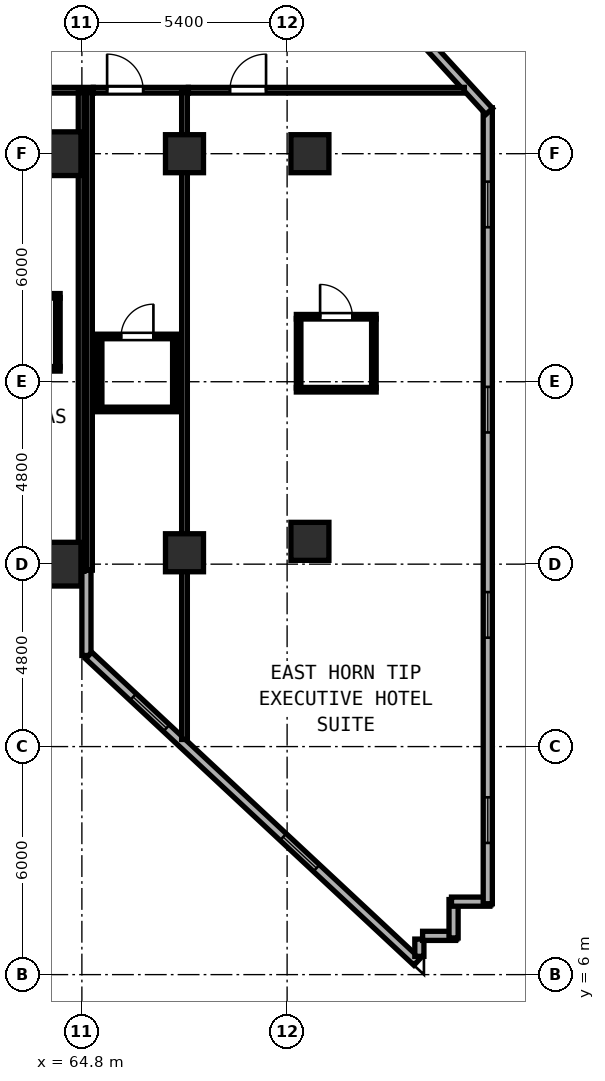
"""IFC4 building model, lengths in metres.
Left out: names, types, materials, properties, quantities, classifications, styles, units other than length and angle.
Written with IfcOpenShell. Run it as: python <this file> out.ifc"""

import sys

from ifc_helpers import new_model, si_unit, direction, frame, frame_2d, origin, origin_2d, place, context, subcontext, project, spatial, rectangle, hollow_rectangle, extrude, element, fill, save


model = new_model("IFC4")
c1 = context("Model", 3, precision=1e-05, world=origin(), true_north=direction((0.0, 1.0)))
c2 = subcontext(c1, "Body", "Model", "MODEL_VIEW")
j1 = project(units=[si_unit("LENGTHUNIT", "METRE"), si_unit("PLANEANGLEUNIT", "RADIAN")], contexts=[c1])
p1 = place(None, origin())
s1 = spatial("IfcSite", under=j1, at=p1, CompositionType="ELEMENT")
p2 = place(p1, origin())
s2 = spatial("IfcBuilding", under=s1, at=p2, CompositionType="ELEMENT")
p3 = place(p2, frame((0.0, 0.0, 62.8)))
s3 = spatial("IfcBuildingStorey", under=s2, at=p3, CompositionType="ELEMENT", Elevation=62.8)
for number, where, z_axis, x_axis in (
    (1, (64.2, 16.8, 0.0), (0.0, 0.0, 1.0), (1.0, 0.0, 0.0)),
    (2, (64.2, 27.6, 0.0), (0.0, 0.0, 1.0), (1.0, 0.0, 0.0)),
):
    element("IfcColumn", number, at=place(p3, frame(where, z_axis=z_axis, x_axis=x_axis)), inside=s3, PredefinedType="COLUMN", context=c2, shape_type="SweptSolid", body=[
        extrude(hollow_rectangle(XDim=1.15, YDim=1.15, WallThickness=0.042, at=origin_2d()), origin(), (0.0, 0.0, 1.0), 3.8),
    ])
for number, where, z_axis, x_axis in (
    (3, (70.8, 17.4, 0.0), (0.0, 0.0, 1.0), (1.0, 0.0, 0.0)),
    (4, (70.8, 27.6, 0.0), (0.0, 0.0, 1.0), (1.0, 0.0, 0.0)),
    (5, (67.5, 17.1, 0.0), (0.0, 0.0, 1.0), (1.0, 0.0, 0.0)),
    (6, (67.5, 27.6, 0.0), (0.0, 0.0, 1.0), (1.0, 0.0, 0.0)),
):
    element("IfcColumn", number, at=place(p3, frame(where, z_axis=z_axis, x_axis=x_axis)), inside=s3, PredefinedType="COLUMN", context=c2, shape_type="SweptSolid", body=[
        extrude(hollow_rectangle(XDim=1.0, YDim=1.0, WallThickness=0.038, at=origin_2d()), origin(), (0.0, 0.0, 1.0), 3.8),
    ])
p4 = place(p3, frame((64.92, 16.64, 0.0), z_axis=(0.0, 0.0, 1.0), x_axis=(0.0, -1.0, 0.0)))
e7 = element("IfcWall", 7, at=p4, inside=s3, PredefinedType="SOLIDWALL", context=c2, shape_type="SweptSolid", body=[
    extrude(rectangle(XDim=2.243, YDim=0.24, at=frame_2d((1.121, 0.0))), origin(), (0.0, 0.0, 1.0), 3.6),
])
p5 = place(p3, frame((64.979, 14.397, 0.0), z_axis=(0.0, 0.0, 1.0), x_axis=(0.731053894258, -0.682319722484, 0.0)))
e8 = element("IfcWall", 8, at=p5, inside=s3, PredefinedType="SOLIDWALL", context=c2, shape_type="SweptSolid", body=[
    extrude(rectangle(XDim=11.818, YDim=0.24, at=frame_2d((5.909, 0.0))), origin(), (0.0, 0.0, 1.0), 3.6),
])
p6 = place(p5, frame((1.6, 0.0, 0.85)))
e9 = element("IfcOpeningElement", 9, at=p6, cuts=e8, PredefinedType="OPENING", context=c2, shape_type="SweptSolid", body=[
    extrude(rectangle(XDim=1.2, YDim=1.85, at=frame_2d((0.6, 0.925))), frame((0.0, 0.13, 0.0), z_axis=(0.0, -1.0, 0.0), x_axis=(1.0, 0.0, 0.0)), (0.0, 0.0, 1.0), 0.26),
])
p7 = place(p5, frame((7.0, 0.0, 0.85)))
e10 = element("IfcOpeningElement", 10, at=p7, cuts=e8, PredefinedType="OPENING", context=c2, shape_type="SweptSolid", body=[
    extrude(rectangle(XDim=1.2, YDim=1.85, at=frame_2d((0.6, 0.925))), frame((0.0, 0.13, 0.0), z_axis=(0.0, -1.0, 0.0), x_axis=(1.0, 0.0, 0.0)), (0.0, 0.0, 1.0), 0.26),
])
p8 = place(p3, frame((73.68, 6.481, 0.0), z_axis=(0.0, 0.0, 1.0), x_axis=(0.0, 1.0, 0.0)))
e11 = element("IfcWall", 11, at=p8, inside=s3, PredefinedType="SOLIDWALL", context=c2, shape_type="SweptSolid", body=[
    extrude(rectangle(XDim=0.454, YDim=0.24, at=frame_2d((0.227, 0.0))), origin(), (0.0, 0.0, 1.0), 3.6),
])
p9 = place(p3, frame((73.765, 7.02, 0.0), z_axis=(0.0, 0.0, 1.0), x_axis=(1.0, 0.0, 0.0)))
e12 = element("IfcWall", 12, at=p9, inside=s3, PredefinedType="SOLIDWALL", context=c2, shape_type="SweptSolid", body=[
    extrude(rectangle(XDim=0.87, YDim=0.24, at=frame_2d((0.435, 0.0))), origin(), (0.0, 0.0, 1.0), 3.6),
])
for number, where, z_axis, x_axis in (
    (13, (74.58, 6.965, 0.0), (0.0, 0.0, 1.0), (0.0, 1.0, 0.0)),
    (14, (74.525, 7.92, 0.0), (0.0, 0.0, 1.0), (1.0, 0.0, 0.0)),
):
    element("IfcWall", number, at=place(p3, frame(where, z_axis=z_axis, x_axis=x_axis)), inside=s3, PredefinedType="SOLIDWALL", context=c2, shape_type="SweptSolid", body=[
        extrude(rectangle(XDim=1.01, YDim=0.24, at=frame_2d((0.505, 0.0))), origin(), (0.0, 0.0, 1.0), 3.6),
    ])
p10 = place(p3, frame((75.48, 7.865, 0.0), z_axis=(0.0, 0.0, 1.0), x_axis=(0.0, 1.0, 0.0)))
e15 = element("IfcWall", 15, at=p10, inside=s3, PredefinedType="SOLIDWALL", context=c2, shape_type="SweptSolid", body=[
    extrude(rectangle(XDim=20.943, YDim=0.24, at=frame_2d((10.472, 0.0))), origin(), (0.0, 0.0, 1.0), 3.6),
])
p11 = place(p10, frame((1.6, 0.0, 0.85)))
e16 = element("IfcOpeningElement", 16, at=p11, cuts=e15, PredefinedType="OPENING", context=c2, shape_type="SweptSolid", body=[
    extrude(rectangle(XDim=1.2, YDim=1.85, at=frame_2d((0.6, 0.925))), frame((0.0, 0.13, 0.0), z_axis=(0.0, -1.0, 0.0), x_axis=(1.0, 0.0, 0.0)), (0.0, 0.0, 1.0), 0.26),
])
p12 = place(p10, frame((7.0, 0.0, 0.85)))
e17 = element("IfcOpeningElement", 17, at=p12, cuts=e15, PredefinedType="OPENING", context=c2, shape_type="SweptSolid", body=[
    extrude(rectangle(XDim=1.2, YDim=1.85, at=frame_2d((0.6, 0.925))), frame((0.0, 0.13, 0.0), z_axis=(0.0, -1.0, 0.0), x_axis=(1.0, 0.0, 0.0)), (0.0, 0.0, 1.0), 0.26),
])
p13 = place(p10, frame((12.4, 0.0, 0.85)))
e18 = element("IfcOpeningElement", 18, at=p13, cuts=e15, PredefinedType="OPENING", context=c2, shape_type="SweptSolid", body=[
    extrude(rectangle(XDim=1.2, YDim=1.85, at=frame_2d((0.6, 0.925))), frame((0.0, 0.13, 0.0), z_axis=(0.0, -1.0, 0.0), x_axis=(1.0, 0.0, 0.0)), (0.0, 0.0, 1.0), 0.26),
])
p14 = place(p10, frame((17.8, 0.0, 0.85)))
e19 = element("IfcOpeningElement", 19, at=p14, cuts=e15, PredefinedType="OPENING", context=c2, shape_type="SweptSolid", body=[
    extrude(rectangle(XDim=1.2, YDim=1.85, at=frame_2d((0.6, 0.925))), frame((0.0, 0.13, 0.0), z_axis=(0.0, -1.0, 0.0), x_axis=(1.0, 0.0, 0.0)), (0.0, 0.0, 1.0), 0.26),
])
p15 = place(p3, frame((75.517, 28.713, 0.0), z_axis=(0.0, 0.0, 1.0), x_axis=(-0.67574145796, 0.737138712858, 0.0)))
e20 = element("IfcWall", 20, at=p15, inside=s3, PredefinedType="SOLIDWALL", context=c2, shape_type="SweptSolid", body=[
    extrude(rectangle(XDim=3.284, YDim=0.24, at=frame_2d((1.642, 0.0))), origin(), (0.0, 0.0, 1.0), 3.6),
])
p16 = place(p3, frame((61.442, 29.27, 0.0), z_axis=(0.0, 0.0, 1.0), x_axis=(1.0, 0.0, 0.0)))
e21 = element("IfcWall", 21, at=p16, inside=s3, PredefinedType="PARTITIONING", context=c2, shape_type="SweptSolid", body=[
    extrude(rectangle(XDim=3.658, YDim=0.15, at=frame_2d((1.829, 0.0))), origin(), (0.0, 0.0, 1.0), 3.6),
])
p17 = place(p16, frame((1.09, 0.0, 0.0), z_axis=(0.0, 0.0, 1.0), x_axis=(-1.0, 0.0, 0.0)))
e22 = element("IfcOpeningElement", 22, at=p17, cuts=e21, PredefinedType="OPENING", context=c2, shape_type="SweptSolid", body=[
    extrude(rectangle(XDim=0.95, YDim=2.15, at=frame_2d((0.475, 1.075))), frame((0.0, 0.085, 0.0), z_axis=(0.0, -1.0, 0.0), x_axis=(1.0, 0.0, 0.0)), (0.0, 0.0, 1.0), 0.17),
])
p18 = place(p3, frame((65.0, 16.642, 0.0), z_axis=(0.0, 0.0, 1.0), x_axis=(0.0, 1.0, 0.0)))
e23 = element("IfcWall", 23, at=p18, inside=s3, PredefinedType="PARTITIONING", context=c2, shape_type="SweptSolid", body=[
    extrude(rectangle(XDim=12.568, YDim=0.15, at=frame_2d((6.284, 0.0))), origin(), (0.0, 0.0, 1.0), 3.6),
])
p19 = place(p3, frame((62.128, 23.86, 0.0), z_axis=(0.0, 0.0, 1.0), x_axis=(1.0, 0.0, 0.0)))
e24 = element("IfcWall", 24, at=p19, inside=s3, PredefinedType="PARTITIONING", context=c2, shape_type="SweptSolid", body=[
    extrude(rectangle(XDim=2.1, YDim=0.12, at=frame_2d((1.05, 0.0))), origin(), (0.0, 0.0, 1.0), 3.6),
])
p20 = place(p19, frame((1.475, 0.0, 0.0), z_axis=(0.0, 0.0, 1.0), x_axis=(-1.0, 0.0, 0.0)))
e25 = element("IfcOpeningElement", 25, at=p20, cuts=e24, PredefinedType="OPENING", context=c2, shape_type="SweptSolid", body=[
    extrude(rectangle(XDim=0.85, YDim=2.1, at=frame_2d((0.425, 1.05))), frame((0.0, 0.07, 0.0), z_axis=(0.0, -1.0, 0.0), x_axis=(1.0, 0.0, 0.0)), (0.0, 0.0, 1.0), 0.14),
])
p21 = place(p3, frame((62.128, 21.94, 0.0), z_axis=(0.0, 0.0, 1.0), x_axis=(1.0, 0.0, 0.0)))
e26 = element("IfcWall", 26, at=p21, inside=s3, PredefinedType="PARTITIONING", context=c2, shape_type="SweptSolid", body=[
    extrude(rectangle(XDim=2.1, YDim=0.12, at=frame_2d((1.05, 0.0))), origin(), (0.0, 0.0, 1.0), 3.6),
])
p22 = place(p3, frame((64.168, 21.985, 0.0), z_axis=(0.0, 0.0, 1.0), x_axis=(0.0, 1.0, 0.0)))
e27 = element("IfcWall", 27, at=p22, inside=s3, PredefinedType="PARTITIONING", context=c2, shape_type="SweptSolid", body=[
    extrude(rectangle(XDim=1.83, YDim=0.12, at=frame_2d((0.915, 0.0))), origin(), (0.0, 0.0, 1.0), 3.097),
])
p23 = place(p3, frame((65.102, 29.27, 0.0), z_axis=(0.0, 0.0, 1.0), x_axis=(1.0, 0.0, 0.0)))
e28 = element("IfcWall", 28, at=p23, inside=s3, PredefinedType="PARTITIONING", context=c2, shape_type="SweptSolid", body=[
    extrude(rectangle(XDim=2.498, YDim=0.15, at=frame_2d((1.249, 0.0))), origin(), (0.0, 0.0, 1.0), 3.6),
])
p24 = place(p23, frame((1.312, 0.0, 0.0), z_axis=(0.0, 0.0, 1.0), x_axis=(-1.0, 0.0, 0.0)))
e29 = element("IfcOpeningElement", 29, at=p24, cuts=e28, PredefinedType="OPENING", context=c2, shape_type="SweptSolid", body=[
    extrude(rectangle(XDim=0.95, YDim=2.15, at=frame_2d((0.475, 1.075))), frame((0.0, 0.085, 0.0), z_axis=(0.0, -1.0, 0.0), x_axis=(1.0, 0.0, 0.0)), (0.0, 0.0, 1.0), 0.17),
])
p25 = place(p3, frame((67.5, 12.188, 0.0), z_axis=(0.0, 0.0, 1.0), x_axis=(0.0, 1.0, 0.0)))
e30 = element("IfcWall", 30, at=p25, inside=s3, PredefinedType="PARTITIONING", context=c2, shape_type="SweptSolid", body=[
    extrude(rectangle(XDim=17.022, YDim=0.15, at=frame_2d((8.511, 0.0))), origin(), (0.0, 0.0, 1.0), 3.6),
])
p26 = place(p3, frame((64.78, 16.612, 0.0), z_axis=(0.0, 0.0, 1.0), x_axis=(0.0, 1.0, 0.0)))
e31 = element("IfcWall", 31, at=p26, inside=s3, PredefinedType="PARTITIONING", context=c2, shape_type="SweptSolid", body=[
    extrude(rectangle(XDim=12.598, YDim=0.15, at=frame_2d((6.299, 0.0))), origin(), (0.0, 0.0, 1.0), 3.6),
])
p27 = place(p3, frame((65.207, 22.791, 0.0), z_axis=(0.0, 0.0, 1.0), x_axis=(1.0, 0.0, 0.0)))
e32 = element("IfcWall", 32, at=p27, inside=s3, PredefinedType="PARTITIONING", context=c2, shape_type="SweptSolid", body=[
    extrude(rectangle(XDim=2.1, YDim=0.12, at=frame_2d((1.05, 0.0))), origin(), (0.0, 0.0, 1.0), 3.6),
])
p28 = place(p27, frame((1.475, 0.0, 0.0), z_axis=(0.0, 0.0, 1.0), x_axis=(-1.0, 0.0, 0.0)))
e33 = element("IfcOpeningElement", 33, at=p28, cuts=e32, PredefinedType="OPENING", context=c2, shape_type="SweptSolid", body=[
    extrude(rectangle(XDim=0.85, YDim=2.1, at=frame_2d((0.425, 1.05))), frame((0.0, 0.07, 0.0), z_axis=(0.0, -1.0, 0.0), x_axis=(1.0, 0.0, 0.0)), (0.0, 0.0, 1.0), 0.14),
])
p29 = place(p3, frame((65.207, 20.871, 0.0), z_axis=(0.0, 0.0, 1.0), x_axis=(1.0, 0.0, 0.0)))
e34 = element("IfcWall", 34, at=p29, inside=s3, PredefinedType="PARTITIONING", context=c2, shape_type="SweptSolid", body=[
    extrude(rectangle(XDim=2.1, YDim=0.12, at=frame_2d((1.05, 0.0))), origin(), (0.0, 0.0, 1.0), 3.6),
])
for number, where, z_axis, x_axis in (
    (35, (65.267, 20.916, 0.0), (0.0, 0.0, 1.0), (0.0, 1.0, 0.0)),
    (36, (67.247, 20.916, 0.0), (0.0, 0.0, 1.0), (0.0, 1.0, 0.0)),
):
    element("IfcWall", number, at=place(p3, frame(where, z_axis=z_axis, x_axis=x_axis)), inside=s3, PredefinedType="PARTITIONING", context=c2, shape_type="SweptSolid", body=[
        extrude(rectangle(XDim=1.83, YDim=0.12, at=frame_2d((0.915, 0.0))), origin(), (0.0, 0.0, 1.0), 3.6),
    ])
p30 = place(p3, frame((67.602, 29.27, 0.0), z_axis=(0.0, 0.0, 1.0), x_axis=(1.0, 0.0, 0.0)))
e37 = element("IfcWall", 37, at=p30, inside=s3, PredefinedType="PARTITIONING", context=c2, shape_type="SweptSolid", body=[
    extrude(rectangle(XDim=7.262, YDim=0.15, at=frame_2d((3.631, 0.0))), origin(), (0.0, 0.0, 1.0), 3.6),
])
p31 = place(p30, frame((2.044, 0.0, 0.0), z_axis=(0.0, 0.0, 1.0), x_axis=(-1.0, 0.0, 0.0)))
e38 = element("IfcOpeningElement", 38, at=p31, cuts=e37, PredefinedType="OPENING", context=c2, shape_type="SweptSolid", body=[
    extrude(rectangle(XDim=0.95, YDim=2.18, at=frame_2d((0.475, 1.09))), frame((0.0, 0.085, 0.0), z_axis=(0.0, -1.0, 0.0), x_axis=(1.0, 0.0, 0.0)), (0.0, 0.0, 1.0), 0.17),
])
p32 = place(p3, frame((70.443, 23.31, 0.0), z_axis=(0.0, 0.0, 1.0), x_axis=(1.0, 0.0, 0.0)))
e39 = element("IfcWall", 39, at=p32, inside=s3, PredefinedType="PARTITIONING", context=c2, shape_type="SweptSolid", body=[
    extrude(rectangle(XDim=2.1, YDim=0.12, at=frame_2d((1.05, 0.0))), origin(), (0.0, 0.0, 1.0), 3.6),
])
p33 = place(p32, frame((1.475, 0.0, 0.0), z_axis=(0.0, 0.0, 1.0), x_axis=(-1.0, 0.0, 0.0)))
e40 = element("IfcOpeningElement", 40, at=p33, cuts=e39, PredefinedType="OPENING", context=c2, shape_type="SweptSolid", body=[
    extrude(rectangle(XDim=0.85, YDim=2.1, at=frame_2d((0.425, 1.05))), frame((0.0, 0.07, 0.0), z_axis=(0.0, -1.0, 0.0), x_axis=(1.0, 0.0, 0.0)), (0.0, 0.0, 1.0), 0.14),
])
p34 = place(p3, frame((70.443, 21.39, 0.0), z_axis=(0.0, 0.0, 1.0), x_axis=(1.0, 0.0, 0.0)))
e41 = element("IfcWall", 41, at=p34, inside=s3, PredefinedType="PARTITIONING", context=c2, shape_type="SweptSolid", body=[
    extrude(rectangle(XDim=2.1, YDim=0.12, at=frame_2d((1.05, 0.0))), origin(), (0.0, 0.0, 1.0), 3.6),
])
for number, where, z_axis, x_axis in (
    (42, (70.503, 21.435, 0.0), (0.0, 0.0, 1.0), (0.0, 1.0, 0.0)),
    (43, (72.483, 21.435, 0.0), (0.0, 0.0, 1.0), (0.0, 1.0, 0.0)),
):
    element("IfcWall", number, at=place(p3, frame(where, z_axis=z_axis, x_axis=x_axis)), inside=s3, PredefinedType="PARTITIONING", context=c2, shape_type="SweptSolid", body=[
        extrude(rectangle(XDim=1.83, YDim=0.12, at=frame_2d((0.915, 0.0))), origin(), (0.0, 0.0, 1.0), 3.6),
    ])
p35 = place(p6, origin())
e44 = element("IfcWindow", 44, at=p35, inside=s3, PartitioningType="SINGLE_PANEL", PredefinedType="WINDOW", context=c2, shape_type="SweptSolid", body=[
    extrude(rectangle(XDim=1.2, YDim=1.85, at=frame_2d((0.6, 0.925))), frame((0.0, 0.03, 0.0), z_axis=(0.0, -1.0, 0.0), x_axis=(1.0, 0.0, 0.0)), (0.0, 0.0, 1.0), 0.06),
])
fill(e9, e44)
p36 = place(p7, origin())
e45 = element("IfcWindow", 45, at=p36, inside=s3, PartitioningType="SINGLE_PANEL", PredefinedType="WINDOW", context=c2, shape_type="SweptSolid", body=[
    extrude(rectangle(XDim=1.2, YDim=1.85, at=frame_2d((0.6, 0.925))), frame((0.0, 0.03, 0.0), z_axis=(0.0, -1.0, 0.0), x_axis=(1.0, 0.0, 0.0)), (0.0, 0.0, 1.0), 0.06),
])
fill(e10, e45)
p37 = place(p11, origin())
e46 = element("IfcWindow", 46, at=p37, inside=s3, PartitioningType="SINGLE_PANEL", PredefinedType="WINDOW", context=c2, shape_type="SweptSolid", body=[
    extrude(rectangle(XDim=1.2, YDim=1.85, at=frame_2d((0.6, 0.925))), frame((0.0, 0.03, 0.0), z_axis=(0.0, -1.0, 0.0), x_axis=(1.0, 0.0, 0.0)), (0.0, 0.0, 1.0), 0.06),
])
fill(e16, e46)
p38 = place(p12, origin())
e47 = element("IfcWindow", 47, at=p38, inside=s3, PartitioningType="SINGLE_PANEL", PredefinedType="WINDOW", context=c2, shape_type="SweptSolid", body=[
    extrude(rectangle(XDim=1.2, YDim=1.85, at=frame_2d((0.6, 0.925))), frame((0.0, 0.03, 0.0), z_axis=(0.0, -1.0, 0.0), x_axis=(1.0, 0.0, 0.0)), (0.0, 0.0, 1.0), 0.06),
])
fill(e17, e47)
p39 = place(p13, origin())
e48 = element("IfcWindow", 48, at=p39, inside=s3, PartitioningType="SINGLE_PANEL", PredefinedType="WINDOW", context=c2, shape_type="SweptSolid", body=[
    extrude(rectangle(XDim=1.2, YDim=1.85, at=frame_2d((0.6, 0.925))), frame((0.0, 0.03, 0.0), z_axis=(0.0, -1.0, 0.0), x_axis=(1.0, 0.0, 0.0)), (0.0, 0.0, 1.0), 0.06),
])
fill(e18, e48)
p40 = place(p14, origin())
e49 = element("IfcWindow", 49, at=p40, inside=s3, PartitioningType="SINGLE_PANEL", PredefinedType="WINDOW", context=c2, shape_type="SweptSolid", body=[
    extrude(rectangle(XDim=1.2, YDim=1.85, at=frame_2d((0.6, 0.925))), frame((0.0, 0.03, 0.0), z_axis=(0.0, -1.0, 0.0), x_axis=(1.0, 0.0, 0.0)), (0.0, 0.0, 1.0), 0.06),
])
fill(e19, e49)
p41 = place(p24, origin())
e50 = element("IfcDoor", 50, at=p41, inside=s3, OperationType="SINGLE_SWING_RIGHT", PredefinedType="DOOR", context=c2, shape_type="SweptSolid", body=[
    extrude(rectangle(XDim=0.95, YDim=2.15, at=frame_2d((0.475, 1.075))), frame((0.0, 0.025, 0.0), z_axis=(0.0, -1.0, 0.0), x_axis=(1.0, 0.0, 0.0)), (0.0, 0.0, 1.0), 0.05),
])
fill(e29, e50)
p42 = place(p28, origin())
e51 = element("IfcDoor", 51, at=p42, inside=s3, OperationType="SINGLE_SWING_LEFT", PredefinedType="DOOR", context=c2, shape_type="SweptSolid", body=[
    extrude(rectangle(XDim=0.85, YDim=2.1, at=frame_2d((0.425, 1.05))), frame((0.0, 0.025, 0.0), z_axis=(0.0, -1.0, 0.0), x_axis=(1.0, 0.0, 0.0)), (0.0, 0.0, 1.0), 0.05),
])
fill(e33, e51)
p43 = place(p31, origin())
e52 = element("IfcDoor", 52, at=p43, inside=s3, OperationType="SINGLE_SWING_LEFT", PredefinedType="DOOR", context=c2, shape_type="SweptSolid", body=[
    extrude(rectangle(XDim=0.95, YDim=2.18, at=frame_2d((0.475, 1.09))), frame((0.0, 0.025, 0.0), z_axis=(0.0, -1.0, 0.0), x_axis=(1.0, 0.0, 0.0)), (0.0, 0.0, 1.0), 0.05),
])
fill(e38, e52)
p44 = place(p33, origin())
e53 = element("IfcDoor", 53, at=p44, inside=s3, OperationType="SINGLE_SWING_RIGHT", PredefinedType="DOOR", context=c2, shape_type="SweptSolid", body=[
    extrude(rectangle(XDim=0.85, YDim=2.1, at=frame_2d((0.425, 1.05))), frame((0.0, 0.025, 0.0), z_axis=(0.0, -1.0, 0.0), x_axis=(1.0, 0.0, 0.0)), (0.0, 0.0, 1.0), 0.05),
])
fill(e40, e53)
save(model, sys.argv[1])
